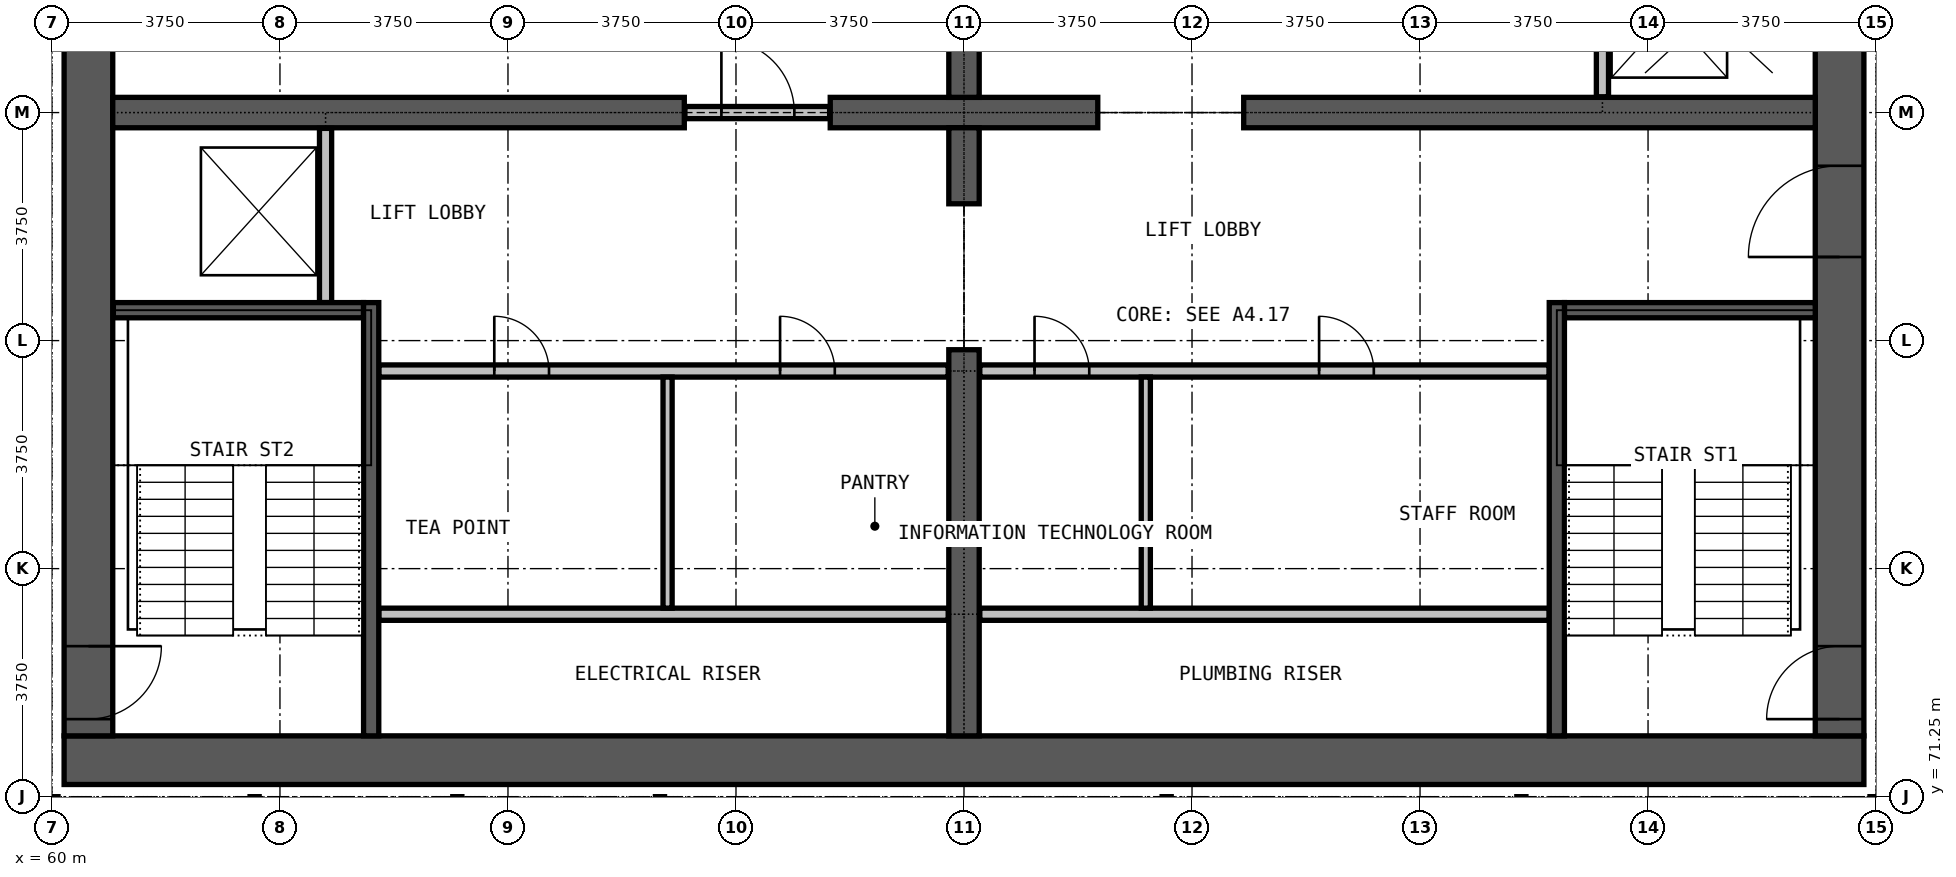
"""IFC4 building model, lengths in metres.
Left out: names, types, materials, properties, quantities, classifications, styles, units other than length and angle.
Written with IfcOpenShell. Run it as: python <this file> out.ifc"""

import sys

from ifc_helpers import new_model, si_unit, direction, frame, frame_2d, origin, place, context, subcontext, project, spatial, rectangle, extrude, element, fill, save


model = new_model("IFC4")
c1 = context("Model", 3, precision=1e-05, world=origin(), true_north=direction((0.0, 1.0)))
c2 = subcontext(c1, "Body", "Model", "MODEL_VIEW")
j1 = project(units=[si_unit("LENGTHUNIT", "METRE"), si_unit("PLANEANGLEUNIT", "RADIAN")], contexts=[c1])
p1 = place(None, origin())
s1 = spatial("IfcSite", under=j1, at=p1, CompositionType="ELEMENT")
p2 = place(p1, origin())
s2 = spatial("IfcBuilding", under=s1, at=p2, CompositionType="ELEMENT")
p3 = place(p2, frame((0.0, 0.0, 172.9)))
s3 = spatial("IfcBuildingStorey", under=s2, at=p3, CompositionType="ELEMENT", Elevation=172.9)
p4 = place(p3, frame((60.2, 71.85, 0.0), z_axis=(0.0, 0.0, 1.0), x_axis=(1.0, 0.0, 0.0)))
e1 = element("IfcWall", 1, at=p4, inside=s3, PredefinedType="SHEAR", context=c2, shape_type="SweptSolid", body=[
    extrude(rectangle(XDim=29.6, YDim=0.8, at=frame_2d((14.8, 0.0))), origin(), (0.0, 0.0, 1.0), 3.6),
])
p5 = place(p3, frame((89.4, 72.25, 0.0), z_axis=(0.0, 0.0, 1.0), x_axis=(0.0, 1.0, 0.0)))
e2 = element("IfcWall", 2, at=p5, inside=s3, PredefinedType="SHEAR", context=c2, shape_type="SweptSolid", body=[
    extrude(rectangle(XDim=20.5, YDim=0.8, at=frame_2d((10.25, 0.0))), origin(), (0.0, 0.0, 1.0), 3.6),
])
p6 = place(p5, frame((0.275, 0.0, 0.0)))
e3 = element("IfcOpeningElement", 3, at=p6, cuts=e2, PredefinedType="OPENING", context=c2, shape_type="SweptSolid", body=[
    extrude(rectangle(XDim=1.2, YDim=2.2, at=frame_2d((0.6, 1.1))), frame((0.0, 0.41, 0.0), z_axis=(0.0, -1.0, 0.0), x_axis=(1.0, 0.0, 0.0)), (0.0, 0.0, 1.0), 0.82),
])
p7 = place(p5, frame((13.775, 0.0, 0.0)))
e4 = element("IfcOpeningElement", 4, at=p7, cuts=e2, PredefinedType="OPENING", context=c2, shape_type="SweptSolid", body=[
    extrude(rectangle(XDim=1.2, YDim=2.2, at=frame_2d((0.6, 1.1))), frame((0.0, 0.41, 0.0), z_axis=(0.0, -1.0, 0.0), x_axis=(1.0, 0.0, 0.0)), (0.0, 0.0, 1.0), 0.82),
])
p8 = place(p5, frame((7.875, 0.0, 0.0)))
e5 = element("IfcOpeningElement", 5, at=p8, cuts=e2, PredefinedType="OPENING", context=c2, shape_type="SweptSolid", body=[
    extrude(rectangle(XDim=1.5, YDim=2.2, at=frame_2d((0.75, 1.1))), frame((0.0, 0.41, 0.0), z_axis=(0.0, -1.0, 0.0), x_axis=(1.0, 0.0, 0.0)), (0.0, 0.0, 1.0), 0.82),
])
p9 = place(p3, frame((60.6, 92.75, 0.0), z_axis=(0.0, 0.0, 1.0), x_axis=(0.0, -1.0, 0.0)))
e6 = element("IfcWall", 6, at=p9, inside=s3, PredefinedType="SHEAR", context=c2, shape_type="SweptSolid", body=[
    extrude(rectangle(XDim=20.5, YDim=0.8, at=frame_2d((10.25, 0.0))), origin(), (0.0, 0.0, 1.0), 3.6),
])
p10 = place(p9, frame((19.025, 0.0, 0.0)))
e7 = element("IfcOpeningElement", 7, at=p10, cuts=e6, PredefinedType="OPENING", context=c2, shape_type="SweptSolid", body=[
    extrude(rectangle(XDim=1.2, YDim=2.2, at=frame_2d((0.6, 1.1))), frame((0.0, 0.41, 0.0), z_axis=(0.0, -1.0, 0.0), x_axis=(1.0, 0.0, 0.0)), (0.0, 0.0, 1.0), 0.82),
])
p11 = place(p9, frame((8.025, 0.0, 0.0)))
e8 = element("IfcOpeningElement", 8, at=p11, cuts=e6, PredefinedType="OPENING", context=c2, shape_type="SweptSolid", body=[
    extrude(rectangle(XDim=1.2, YDim=2.2, at=frame_2d((0.6, 1.1))), frame((0.0, 0.41, 0.0), z_axis=(0.0, -1.0, 0.0), x_axis=(1.0, 0.0, 0.0)), (0.0, 0.0, 1.0), 0.82),
])
p12 = place(p3, frame((61.0, 82.5, 0.0), z_axis=(0.0, 0.0, 1.0), x_axis=(1.0, 0.0, 0.0)))
e9 = element("IfcWall", 9, at=p12, inside=s3, PredefinedType="SHEAR", context=c2, shape_type="SweptSolid", body=[
    extrude(rectangle(XDim=9.4, YDim=0.5, at=frame_2d((4.7, 0.0))), origin(), (0.0, 0.0, 1.0), 3.6),
])
p13 = place(p3, frame((72.8, 82.5, 0.0), z_axis=(0.0, 0.0, 1.0), x_axis=(1.0, 0.0, 0.0)))
e10 = element("IfcWall", 10, at=p13, inside=s3, PredefinedType="SHEAR", context=c2, shape_type="SweptSolid", body=[
    extrude(rectangle(XDim=4.4, YDim=0.5, at=frame_2d((2.2, 0.0))), origin(), (0.0, 0.0, 1.0), 3.6),
])
p14 = place(p3, frame((79.6, 82.5, 0.0), z_axis=(0.0, 0.0, 1.0), x_axis=(1.0, 0.0, 0.0)))
e11 = element("IfcWall", 11, at=p14, inside=s3, PredefinedType="SHEAR", context=c2, shape_type="SweptSolid", body=[
    extrude(rectangle(XDim=9.4, YDim=0.5, at=frame_2d((4.7, 0.0))), origin(), (0.0, 0.0, 1.0), 3.6),
])
p15 = place(p3, frame((75.0, 72.25, 0.0), z_axis=(0.0, 0.0, 1.0), x_axis=(0.0, 1.0, 0.0)))
e12 = element("IfcWall", 12, at=p15, inside=s3, PredefinedType="SHEAR", context=c2, shape_type="SweptSolid", body=[
    extrude(rectangle(XDim=6.35, YDim=0.5, at=frame_2d((3.175, 0.0))), origin(), (0.0, 0.0, 1.0), 3.6),
])
for number, where, z_axis, x_axis in (
    (13, (75.0, 81.0, 0.0), (0.0, 0.0, 1.0), (0.0, 1.0, 0.0)),
    (14, (75.0, 82.75, 0.0), (0.0, 0.0, 1.0), (0.0, 1.0, 0.0)),
):
    element("IfcWall", number, at=place(p3, frame(where, z_axis=z_axis, x_axis=x_axis)), inside=s3, PredefinedType="SHEAR", context=c2, shape_type="SweptSolid", body=[
        extrude(rectangle(XDim=1.25, YDim=0.5, at=frame_2d((0.625, 0.0))), origin(), (0.0, 0.0, 1.0), 3.6),
    ])
for number, where, z_axis, x_axis in (
    (15, (65.375, 74.25, 0.0), (0.0, 0.0, 1.0), (1.0, 0.0, 0.0)),
    (16, (75.26, 74.25, 0.0), (0.0, 0.0, 1.0), (1.0, 0.0, 0.0)),
):
    element("IfcWall", number, at=place(p3, frame(where, z_axis=z_axis, x_axis=x_axis)), inside=s3, PredefinedType="PARTITIONING", context=c2, shape_type="SweptSolid", body=[
        extrude(rectangle(XDim=9.365, YDim=0.2, at=frame_2d((4.683, 0.0))), origin(), (0.0, 0.0, 1.0), 3.3),
    ])
p16 = place(p3, frame((65.375, 78.25, 0.0), z_axis=(0.0, 0.0, 1.0), x_axis=(1.0, 0.0, 0.0)))
e17 = element("IfcWall", 17, at=p16, inside=s3, PredefinedType="PARTITIONING", context=c2, shape_type="SweptSolid", body=[
    extrude(rectangle(XDim=9.365, YDim=0.2, at=frame_2d((4.683, 0.0))), origin(), (0.0, 0.0, 1.0), 3.3),
])
p17 = place(p16, frame((1.9, 0.0, 0.0)))
e18 = element("IfcOpeningElement", 18, at=p17, cuts=e17, PredefinedType="OPENING", context=c2, shape_type="SweptSolid", body=[
    extrude(rectangle(XDim=0.9, YDim=2.2, at=frame_2d((0.45, 1.1))), frame((0.0, 0.11, 0.0), z_axis=(0.0, -1.0, 0.0), x_axis=(1.0, 0.0, 0.0)), (0.0, 0.0, 1.0), 0.22),
])
p18 = place(p16, frame((6.6, 0.0, 0.0)))
e19 = element("IfcOpeningElement", 19, at=p18, cuts=e17, PredefinedType="OPENING", context=c2, shape_type="SweptSolid", body=[
    extrude(rectangle(XDim=0.9, YDim=2.2, at=frame_2d((0.45, 1.1))), frame((0.0, 0.11, 0.0), z_axis=(0.0, -1.0, 0.0), x_axis=(1.0, 0.0, 0.0)), (0.0, 0.0, 1.0), 0.22),
])
p19 = place(p3, frame((75.26, 78.25, 0.0), z_axis=(0.0, 0.0, 1.0), x_axis=(1.0, 0.0, 0.0)))
e20 = element("IfcWall", 20, at=p19, inside=s3, PredefinedType="PARTITIONING", context=c2, shape_type="SweptSolid", body=[
    extrude(rectangle(XDim=9.365, YDim=0.2, at=frame_2d((4.683, 0.0))), origin(), (0.0, 0.0, 1.0), 3.3),
])
p20 = place(p19, frame((0.9, 0.0, 0.0)))
e21 = element("IfcOpeningElement", 21, at=p20, cuts=e20, PredefinedType="OPENING", context=c2, shape_type="SweptSolid", body=[
    extrude(rectangle(XDim=0.9, YDim=2.2, at=frame_2d((0.45, 1.1))), frame((0.0, 0.11, 0.0), z_axis=(0.0, -1.0, 0.0), x_axis=(1.0, 0.0, 0.0)), (0.0, 0.0, 1.0), 0.22),
])
p21 = place(p19, frame((5.58, 0.0, 0.0)))
e22 = element("IfcOpeningElement", 22, at=p21, cuts=e20, PredefinedType="OPENING", context=c2, shape_type="SweptSolid", body=[
    extrude(rectangle(XDim=0.9, YDim=2.2, at=frame_2d((0.45, 1.1))), frame((0.0, 0.11, 0.0), z_axis=(0.0, -1.0, 0.0), x_axis=(1.0, 0.0, 0.0)), (0.0, 0.0, 1.0), 0.22),
])
p22 = place(p3, frame((70.41, 82.5, 0.0), z_axis=(0.0, 0.0, 1.0), x_axis=(1.0, 0.0, 0.0)))
e23 = element("IfcWall", 23, at=p22, inside=s3, PredefinedType="PARTITIONING", context=c2, shape_type="SweptSolid", body=[
    extrude(rectangle(XDim=2.38, YDim=0.2, at=frame_2d((1.19, 0.0))), origin(), (0.0, 0.0, 1.0), 2.4),
])
p23 = place(p22, frame((0.6, 0.0, 0.0)))
e24 = element("IfcOpeningElement", 24, at=p23, cuts=e23, PredefinedType="OPENING", context=c2, shape_type="SweptSolid", body=[
    extrude(rectangle(XDim=1.2, YDim=2.2, at=frame_2d((0.6, 1.1))), frame((0.0, 0.11, 0.0), z_axis=(0.0, -1.0, 0.0), x_axis=(1.0, 0.0, 0.0)), (0.0, 0.0, 1.0), 0.22),
])
for number, where, z_axis, x_axis in (
    (25, (70.125, 74.35, 0.0), (0.0, 0.0, 1.0), (0.0, 1.0, 0.0)),
    (26, (77.99, 74.35, 0.0), (0.0, 0.0, 1.0), (0.0, 1.0, 0.0)),
):
    element("IfcWall", number, at=place(p3, frame(where, z_axis=z_axis, x_axis=x_axis)), inside=s3, PredefinedType="PARTITIONING", context=c2, shape_type="SweptSolid", body=[
        extrude(rectangle(XDim=3.8, YDim=0.15, at=frame_2d((1.9, 0.0))), origin(), (0.0, 0.0, 1.0), 3.3),
    ])
p24 = place(p3, frame((64.5, 79.375, 0.0), z_axis=(0.0, 0.0, 1.0), x_axis=(0.0, 1.0, 0.0)))
e27 = element("IfcWall", 27, at=p24, inside=s3, PredefinedType="PARTITIONING", context=c2, shape_type="SweptSolid", body=[
    extrude(rectangle(XDim=2.865, YDim=0.2, at=frame_2d((1.433, 0.0))), origin(), (0.0, 0.0, 1.0), 3.3),
])
p25 = place(p3, frame((85.5, 82.76, 0.0), z_axis=(0.0, 0.0, 1.0), x_axis=(0.0, 1.0, 0.0)))
e28 = element("IfcWall", 28, at=p25, inside=s3, PredefinedType="PARTITIONING", context=c2, shape_type="SweptSolid", body=[
    extrude(rectangle(XDim=2.865, YDim=0.2, at=frame_2d((1.433, 0.0))), origin(), (0.0, 0.0, 1.0), 3.3),
])
p26 = place(p25, frame((0.9, 0.0, 0.0)))
e29 = element("IfcOpeningElement", 29, at=p26, cuts=e28, PredefinedType="OPENING", context=c2, shape_type="SweptSolid", body=[
    extrude(rectangle(XDim=1.1, YDim=2.2, at=frame_2d((0.55, 1.1))), frame((0.0, 0.11, 0.0), z_axis=(0.0, -1.0, 0.0), x_axis=(1.0, 0.0, 0.0)), (0.0, 0.0, 1.0), 0.22),
])
p27 = place(p3, frame((61.01, 79.25, 0.0), z_axis=(0.0, 0.0, 1.0), x_axis=(1.0, 0.0, 0.0)))
e30 = element("IfcWall", 30, at=p27, inside=s3, PredefinedType="PARTITIONING", context=c2, shape_type="SweptSolid", body=[
    extrude(rectangle(XDim=4.115, YDim=0.25, at=frame_2d((2.058, 0.0))), origin(), (0.0, 0.0, 1.0), 3.3),
])
p28 = place(p3, frame((84.875, 79.25, 0.0), z_axis=(0.0, 0.0, 1.0), x_axis=(1.0, 0.0, 0.0)))
e31 = element("IfcWall", 31, at=p28, inside=s3, PredefinedType="PARTITIONING", context=c2, shape_type="SweptSolid", body=[
    extrude(rectangle(XDim=4.125, YDim=0.25, at=frame_2d((2.062, 0.0))), origin(), (0.0, 0.0, 1.0), 3.3),
])
for number, where, z_axis, x_axis in (
    (32, (65.25, 72.25, 0.0), (0.0, 0.0, 1.0), (0.0, 1.0, 0.0)),
    (33, (84.75, 72.25, 0.0), (0.0, 0.0, 1.0), (0.0, 1.0, 0.0)),
):
    element("IfcWall", number, at=place(p3, frame(where, z_axis=z_axis, x_axis=x_axis)), inside=s3, PredefinedType="PARTITIONING", context=c2, shape_type="SweptSolid", body=[
        extrude(rectangle(XDim=7.125, YDim=0.25, at=frame_2d((3.562, 0.0))), origin(), (0.0, 0.0, 1.0), 3.3),
    ])
p29 = place(p23, origin())
e34 = element("IfcDoor", 34, at=p29, inside=s3, OperationType="SINGLE_SWING_LEFT", PredefinedType="DOOR", context=c2, shape_type="SweptSolid", body=[
    extrude(rectangle(XDim=1.2, YDim=2.2, at=frame_2d((0.6, 1.1))), frame((0.0, 0.025, 0.0), z_axis=(0.0, -1.0, 0.0), x_axis=(1.0, 0.0, 0.0)), (0.0, 0.0, 1.0), 0.05),
])
fill(e24, e34)
p30 = place(p6, origin())
e35 = element("IfcDoor", 35, at=p30, inside=s3, OperationType="SINGLE_SWING_LEFT", PredefinedType="DOOR", context=c2, shape_type="SweptSolid", body=[
    extrude(rectangle(XDim=1.2, YDim=2.2, at=frame_2d((0.6, 1.1))), frame((0.0, 0.025, 0.0), z_axis=(0.0, -1.0, 0.0), x_axis=(1.0, 0.0, 0.0)), (0.0, 0.0, 1.0), 0.05),
])
fill(e3, e35)
p31 = place(p10, origin())
e36 = element("IfcDoor", 36, at=p31, inside=s3, OperationType="SINGLE_SWING_RIGHT", PredefinedType="DOOR", context=c2, shape_type="SweptSolid", body=[
    extrude(rectangle(XDim=1.2, YDim=2.2, at=frame_2d((0.6, 1.1))), frame((0.0, 0.025, 0.0), z_axis=(0.0, -1.0, 0.0), x_axis=(1.0, 0.0, 0.0)), (0.0, 0.0, 1.0), 0.05),
])
fill(e7, e36)
p32 = place(p8, origin())
e37 = element("IfcDoor", 37, at=p32, inside=s3, OperationType="DOUBLE_DOOR_SINGLE_SWING", PredefinedType="DOOR", context=c2, shape_type="SweptSolid", body=[
    extrude(rectangle(XDim=1.5, YDim=2.2, at=frame_2d((0.75, 1.1))), frame((0.0, 0.025, 0.0), z_axis=(0.0, -1.0, 0.0), x_axis=(1.0, 0.0, 0.0)), (0.0, 0.0, 1.0), 0.05),
])
fill(e5, e37)
p33 = place(p17, origin())
e38 = element("IfcDoor", 38, at=p33, inside=s3, OperationType="SINGLE_SWING_LEFT", PredefinedType="DOOR", context=c2, shape_type="SweptSolid", body=[
    extrude(rectangle(XDim=0.9, YDim=2.2, at=frame_2d((0.45, 1.1))), frame((0.0, 0.025, 0.0), z_axis=(0.0, -1.0, 0.0), x_axis=(1.0, 0.0, 0.0)), (0.0, 0.0, 1.0), 0.05),
])
fill(e18, e38)
p34 = place(p18, origin())
e39 = element("IfcDoor", 39, at=p34, inside=s3, OperationType="SINGLE_SWING_RIGHT", PredefinedType="DOOR", context=c2, shape_type="SweptSolid", body=[
    extrude(rectangle(XDim=0.9, YDim=2.2, at=frame_2d((0.45, 1.1))), frame((0.0, 0.025, 0.0), z_axis=(0.0, -1.0, 0.0), x_axis=(1.0, 0.0, 0.0)), (0.0, 0.0, 1.0), 0.05),
])
fill(e19, e39)
p35 = place(p20, origin())
e40 = element("IfcDoor", 40, at=p35, inside=s3, OperationType="SINGLE_SWING_LEFT", PredefinedType="DOOR", context=c2, shape_type="SweptSolid", body=[
    extrude(rectangle(XDim=0.9, YDim=2.2, at=frame_2d((0.45, 1.1))), frame((0.0, 0.025, 0.0), z_axis=(0.0, -1.0, 0.0), x_axis=(1.0, 0.0, 0.0)), (0.0, 0.0, 1.0), 0.05),
])
fill(e21, e40)
p36 = place(p21, origin())
e41 = element("IfcDoor", 41, at=p36, inside=s3, OperationType="SINGLE_SWING_LEFT", PredefinedType="DOOR", context=c2, shape_type="SweptSolid", body=[
    extrude(rectangle(XDim=0.9, YDim=2.2, at=frame_2d((0.45, 1.1))), frame((0.0, 0.025, 0.0), z_axis=(0.0, -1.0, 0.0), x_axis=(1.0, 0.0, 0.0)), (0.0, 0.0, 1.0), 0.05),
])
fill(e22, e41)
save(model, sys.argv[1])
